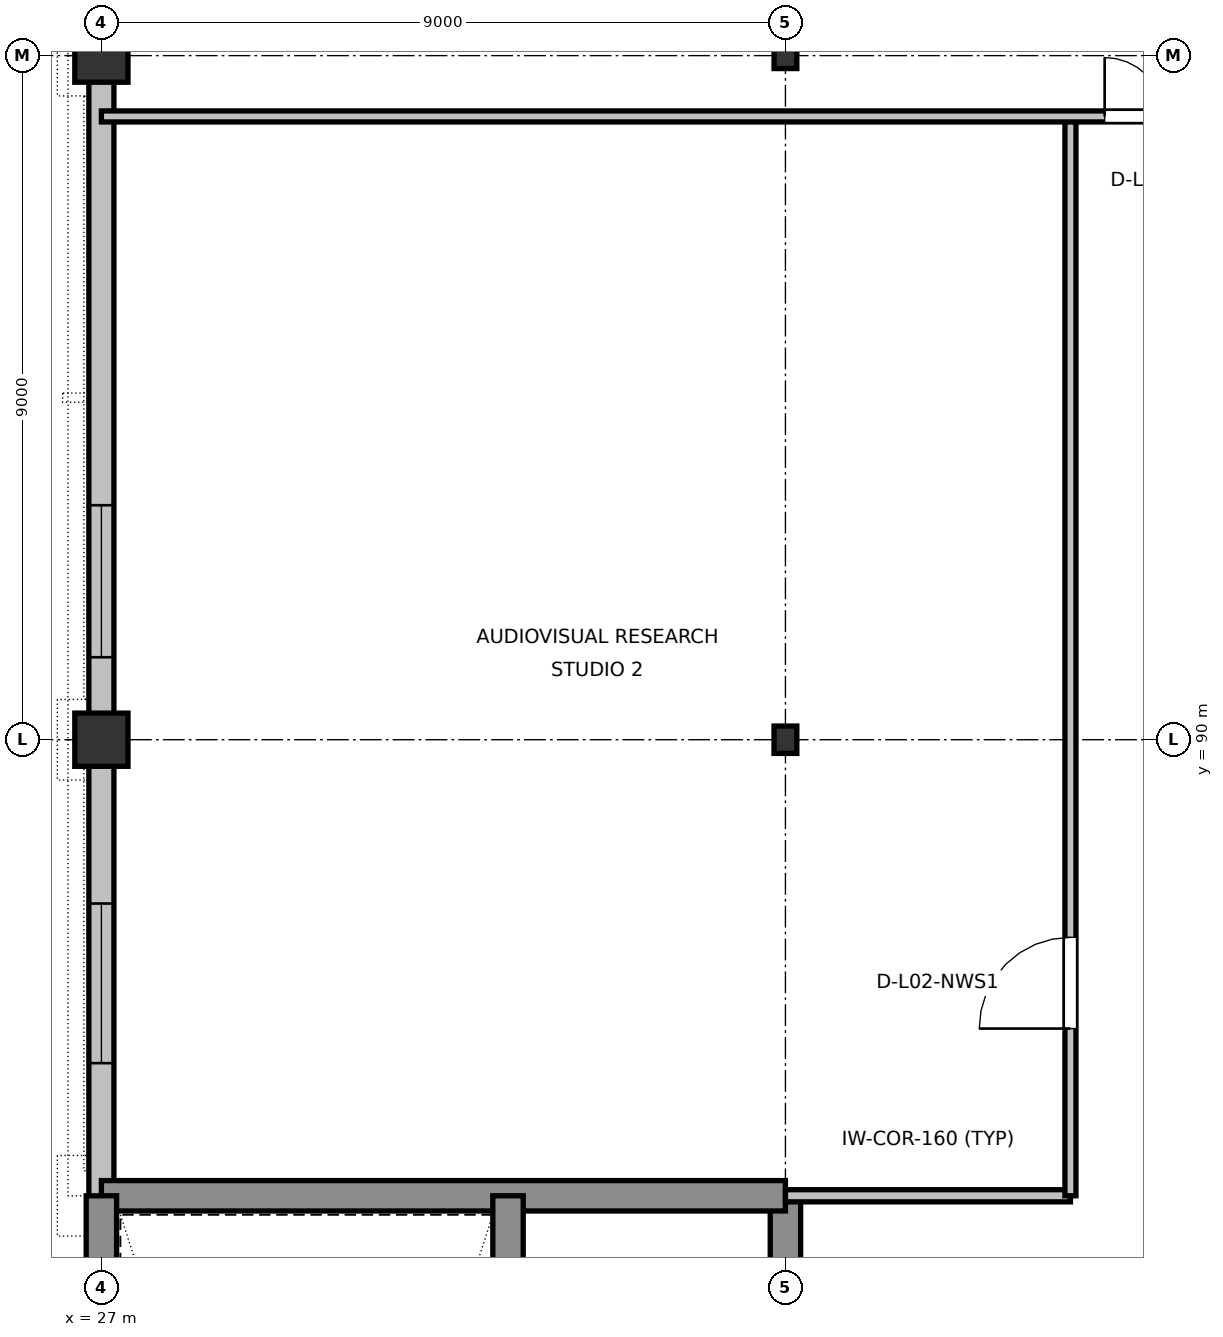
"""IFC4 building model, lengths in metres.
Left out: names, types, materials, properties, quantities, classifications, styles, units other than length and angle.
Written with IfcOpenShell. Run it as: python <this file> out.ifc"""

import sys

from ifc_helpers import new_model, si_unit, direction, frame, frame_2d, origin, origin_2d, place, context, subcontext, project, spatial, rectangle, i_section, extrude, element, fill, save


model = new_model("IFC4")
c1 = context("Model", 3, precision=1e-05, world=origin(), true_north=direction((0.0, 1.0)))
c2 = subcontext(c1, "Body", "Model", "MODEL_VIEW")
j1 = project(units=[si_unit("LENGTHUNIT", "METRE"), si_unit("PLANEANGLEUNIT", "RADIAN")], contexts=[c1])
p1 = place(None, origin())
s1 = spatial("IfcSite", under=j1, at=p1, CompositionType="ELEMENT")
p2 = place(p1, origin())
s2 = spatial("IfcBuilding", under=s1, at=p2, CompositionType="ELEMENT")
p3 = place(p2, frame((0.0, 0.0, 10.2)))
s3 = spatial("IfcBuildingStorey", under=s2, at=p3, CompositionType="ELEMENT", Elevation=10.2)
for number, where, z_axis, x_axis in (
    (1, (27.0, 90.0, 0.0), (0.0, 0.0, 1.0), (1.0, 0.0, 0.0)),
    (2, (27.0, 99.0, 0.0), (0.0, 0.0, 1.0), (1.0, 0.0, 0.0)),
):
    element("IfcColumn", number, at=place(p3, frame(where, z_axis=z_axis, x_axis=x_axis)), inside=s3, PredefinedType="COLUMN", context=c2, shape_type="SweptSolid", body=[
        extrude(rectangle(XDim=0.7, YDim=0.7, at=origin_2d()), origin(), (0.0, 0.0, 1.0), 4.8),
    ])
p4 = place(p3, frame((36.0, 90.0, 0.0), z_axis=(0.0, 0.0, 1.0), x_axis=(1.0, 0.0, 0.0)))
e3 = element("IfcColumn", 3, at=p4, inside=s3, PredefinedType="COLUMN", context=c2, shape_type="SweptSolid", body=[
    extrude(i_section(OverallWidth=0.3, OverallDepth=0.36, WebThickness=0.012, FlangeThickness=0.022, at=origin_2d()), origin(), (0.0, 0.0, 1.0), 4.8),
])
p5 = place(p3, frame((36.0, 99.0, 0.0), z_axis=(0.0, 0.0, 1.0), x_axis=(1.0, 0.0, 0.0)))
e4 = element("IfcColumn", 4, at=p5, inside=s3, PredefinedType="COLUMN", context=c2, shape_type="SweptSolid", body=[
    extrude(i_section(OverallWidth=0.3, OverallDepth=0.34, WebThickness=0.012, FlangeThickness=0.021, at=origin_2d()), origin(), (0.0, 0.0, 1.0), 4.8),
])
p6 = place(p3, frame((27.0, 89.665, 0.0), z_axis=(0.0, 0.0, 1.0), x_axis=(0.0, -1.0, 0.0)))
e5 = element("IfcWall", 5, at=p6, inside=s3, PredefinedType="STANDARD", context=c2, shape_type="SweptSolid", body=[
    extrude(rectangle(XDim=5.74, YDim=0.33, at=frame_2d((2.87, 0.0))), origin(), (0.0, 0.0, 1.0), 4.235),
])
p7 = place(p6, frame((1.82, 0.0, 0.9)))
e6 = element("IfcOpeningElement", 6, at=p7, cuts=e5, PredefinedType="OPENING", context=c2, shape_type="SweptSolid", body=[
    extrude(rectangle(XDim=2.1, YDim=2.25, at=frame_2d((1.05, 1.125))), frame((0.0, 0.175, 0.0), z_axis=(0.0, -1.0, 0.0), x_axis=(1.0, 0.0, 0.0)), (0.0, 0.0, 1.0), 0.35),
])
p8 = place(p3, frame((27.0, 98.665, 0.0), z_axis=(0.0, 0.0, 1.0), x_axis=(0.0, -1.0, 0.0)))
e7 = element("IfcWall", 7, at=p8, inside=s3, PredefinedType="STANDARD", context=c2, shape_type="SweptSolid", body=[
    extrude(rectangle(XDim=8.33, YDim=0.33, at=frame_2d((4.165, 0.0))), origin(), (0.0, 0.0, 1.0), 4.235),
])
p9 = place(p8, frame((5.58, 0.0, 0.9)))
e8 = element("IfcOpeningElement", 8, at=p9, cuts=e7, PredefinedType="OPENING", context=c2, shape_type="SweptSolid", body=[
    extrude(rectangle(XDim=2.0, YDim=2.2, at=frame_2d((1.0, 1.1))), frame((0.0, 0.175, 0.0), z_axis=(0.0, -1.0, 0.0), x_axis=(1.0, 0.0, 0.0)), (0.0, 0.0, 1.0), 0.35),
])
p10 = place(p3, frame((36.0, 66.0, 0.0), z_axis=(0.0, 0.0, 1.0), x_axis=(0.0, 1.0, 0.0)))
e9 = element("IfcWall", 9, at=p10, inside=s3, PredefinedType="SHEAR", context=c2, shape_type="SweptSolid", body=[
    extrude(rectangle(XDim=18.0, YDim=0.4, at=frame_2d((9.0, 0.0))), origin(), (0.0, 0.0, 1.0), 4.56),
])
p11 = place(p10, frame((0.8, 0.0, 0.0)))
e10 = element("IfcOpeningElement", 10, at=p11, cuts=e9, PredefinedType="OPENING", context=c2, shape_type="SweptSolid", body=[
    extrude(rectangle(XDim=1.1, YDim=2.16, at=frame_2d((0.55, 1.08))), frame((0.0, 0.21, 0.0), z_axis=(0.0, -1.0, 0.0), x_axis=(1.0, 0.0, 0.0)), (0.0, 0.0, 1.0), 0.42),
])
p12 = place(p10, frame((3.2, 0.0, 0.0)))
e11 = element("IfcOpeningElement", 11, at=p12, cuts=e9, PredefinedType="OPENING", context=c2, shape_type="SweptSolid", body=[
    extrude(rectangle(XDim=1.2, YDim=2.2, at=frame_2d((0.6, 1.1))), frame((0.0, 0.21, 0.0), z_axis=(0.0, -1.0, 0.0), x_axis=(1.0, 0.0, 0.0)), (0.0, 0.0, 1.0), 0.42),
])
p13 = place(p10, frame((6.8, 0.0, 0.0)))
e12 = element("IfcOpeningElement", 12, at=p13, cuts=e9, PredefinedType="OPENING", context=c2, shape_type="SweptSolid", body=[
    extrude(rectangle(XDim=0.85, YDim=2.1, at=frame_2d((0.425, 1.05))), frame((0.0, 0.21, 0.0), z_axis=(0.0, -1.0, 0.0), x_axis=(1.0, 0.0, 0.0)), (0.0, 0.0, 1.0), 0.42),
])
p14 = place(p3, frame((36.0, 84.0, 0.0), z_axis=(0.0, 0.0, 1.0), x_axis=(-1.0, 0.0, 0.0)))
e13 = element("IfcWall", 13, at=p14, inside=s3, PredefinedType="SHEAR", context=c2, shape_type="SweptSolid", body=[
    extrude(rectangle(XDim=9.0, YDim=0.4, at=frame_2d((4.5, 0.0))), origin(), (0.0, 0.0, 1.0), 4.56),
])
p15 = place(p3, frame((27.0, 84.0, 0.0), z_axis=(0.0, 0.0, 1.0), x_axis=(0.0, -1.0, 0.0)))
e14 = element("IfcWall", 14, at=p15, inside=s3, PredefinedType="SHEAR", context=c2, shape_type="SweptSolid", body=[
    extrude(rectangle(XDim=18.0, YDim=0.4, at=frame_2d((9.0, 0.0))), origin(), (0.0, 0.0, 1.0), 4.56),
])
p16 = place(p3, frame((32.35, 66.0, 0.0), z_axis=(0.0, 0.0, 1.0), x_axis=(0.0, 1.0, 0.0)))
e15 = element("IfcWall", 15, at=p16, inside=s3, PredefinedType="SHEAR", context=c2, shape_type="SweptSolid", body=[
    extrude(rectangle(XDim=18.0, YDim=0.4, at=frame_2d((9.0, 0.0))), origin(), (0.0, 0.0, 1.0), 4.56),
])
p17 = place(p16, frame((0.7, 0.0, 0.0)))
e16 = element("IfcOpeningElement", 16, at=p17, cuts=e15, PredefinedType="OPENING", context=c2, shape_type="SweptSolid", body=[
    extrude(rectangle(XDim=1.1, YDim=2.16, at=frame_2d((0.55, 1.08))), frame((0.0, 0.21, 0.0), z_axis=(0.0, -1.0, 0.0), x_axis=(1.0, 0.0, 0.0)), (0.0, 0.0, 1.0), 0.42),
])
p18 = place(p3, frame((36.0, 84.0, 0.0), z_axis=(0.0, 0.0, 1.0), x_axis=(1.0, 0.0, 0.0)))
e17 = element("IfcWall", 17, at=p18, inside=s3, PredefinedType="PARTITIONING", context=c2, shape_type="SweptSolid", body=[
    extrude(rectangle(XDim=3.75, YDim=0.16, at=frame_2d((1.875, 0.0))), origin(), (0.0, 0.0, 1.0), 4.215),
])
p19 = place(p3, frame((39.75, 84.0, 0.0), z_axis=(0.0, 0.0, 1.0), x_axis=(0.0, 1.0, 0.0)))
e18 = element("IfcWall", 18, at=p19, inside=s3, PredefinedType="PARTITIONING", context=c2, shape_type="SweptSolid", body=[
    extrude(rectangle(XDim=14.2, YDim=0.145, at=frame_2d((7.1, 0.0))), origin(), (0.0, 0.0, 1.0), 4.56),
])
p20 = place(p19, frame((2.2, 0.0, 0.0)))
e19 = element("IfcOpeningElement", 19, at=p20, cuts=e18, PredefinedType="OPENING", context=c2, shape_type="SweptSolid", body=[
    extrude(rectangle(XDim=1.2, YDim=2.18, at=frame_2d((0.6, 1.09))), frame((0.0, 0.083, 0.0), z_axis=(0.0, -1.0, 0.0), x_axis=(1.0, 0.0, 0.0)), (0.0, 0.0, 1.0), 0.165),
])
p21 = place(p3, frame((27.0, 98.2, 0.0), z_axis=(0.0, 0.0, 1.0), x_axis=(1.0, 0.0, 0.0)))
e20 = element("IfcWall", 20, at=p21, inside=s3, PredefinedType="PARTITIONING", context=c2, shape_type="SweptSolid", body=[
    extrude(rectangle(XDim=54.0, YDim=0.145, at=frame_2d((27.0, 0.0))), origin(), (0.0, 0.0, 1.0), 4.56),
])
p22 = place(p21, frame((13.2, 0.0, 0.0)))
e21 = element("IfcOpeningElement", 21, at=p22, cuts=e20, PredefinedType="OPENING", context=c2, shape_type="SweptSolid", body=[
    extrude(rectangle(XDim=1.55, YDim=2.24, at=frame_2d((0.775, 1.12))), frame((0.0, 0.083, 0.0), z_axis=(0.0, -1.0, 0.0), x_axis=(1.0, 0.0, 0.0)), (0.0, 0.0, 1.0), 0.165),
])
p23 = place(p21, frame((28.8, 0.0, 0.0)))
e22 = element("IfcOpeningElement", 22, at=p23, cuts=e20, PredefinedType="OPENING", context=c2, shape_type="SweptSolid", body=[
    extrude(rectangle(XDim=1.55, YDim=2.24, at=frame_2d((0.775, 1.12))), frame((0.0, 0.083, 0.0), z_axis=(0.0, -1.0, 0.0), x_axis=(1.0, 0.0, 0.0)), (0.0, 0.0, 1.0), 0.165),
])
p24 = place(p7, origin())
e23 = element("IfcWindow", 23, at=p24, inside=s3, PartitioningType="SINGLE_PANEL", PredefinedType="WINDOW", context=c2, shape_type="SweptSolid", body=[
    extrude(rectangle(XDim=2.1, YDim=2.25, at=frame_2d((1.05, 1.125))), frame((0.0, 0.03, 0.0), z_axis=(0.0, -1.0, 0.0), x_axis=(1.0, 0.0, 0.0)), (0.0, 0.0, 1.0), 0.06),
])
fill(e6, e23)
p25 = place(p9, origin())
e24 = element("IfcWindow", 24, at=p25, inside=s3, PartitioningType="SINGLE_PANEL", PredefinedType="WINDOW", context=c2, shape_type="SweptSolid", body=[
    extrude(rectangle(XDim=2.0, YDim=2.2, at=frame_2d((1.0, 1.1))), frame((0.0, 0.03, 0.0), z_axis=(0.0, -1.0, 0.0), x_axis=(1.0, 0.0, 0.0)), (0.0, 0.0, 1.0), 0.06),
])
fill(e8, e24)
p26 = place(p20, origin())
e25 = element("IfcDoor", 25, at=p26, inside=s3, OperationType="SINGLE_SWING_LEFT", PredefinedType="DOOR", context=c2, shape_type="SweptSolid", body=[
    extrude(rectangle(XDim=1.2, YDim=2.18, at=frame_2d((0.6, 1.09))), frame((0.0, 0.025, 0.0), z_axis=(0.0, -1.0, 0.0), x_axis=(1.0, 0.0, 0.0)), (0.0, 0.0, 1.0), 0.05),
])
fill(e19, e25)
p27 = place(p22, origin())
e26 = element("IfcDoor", 26, at=p27, inside=s3, OperationType="DOUBLE_DOOR_SINGLE_SWING", PredefinedType="DOOR", context=c2, shape_type="SweptSolid", body=[
    extrude(rectangle(XDim=1.55, YDim=2.24, at=frame_2d((0.775, 1.12))), frame((0.0, 0.025, 0.0), z_axis=(0.0, -1.0, 0.0), x_axis=(1.0, 0.0, 0.0)), (0.0, 0.0, 1.0), 0.05),
])
fill(e21, e26)
save(model, sys.argv[1])
